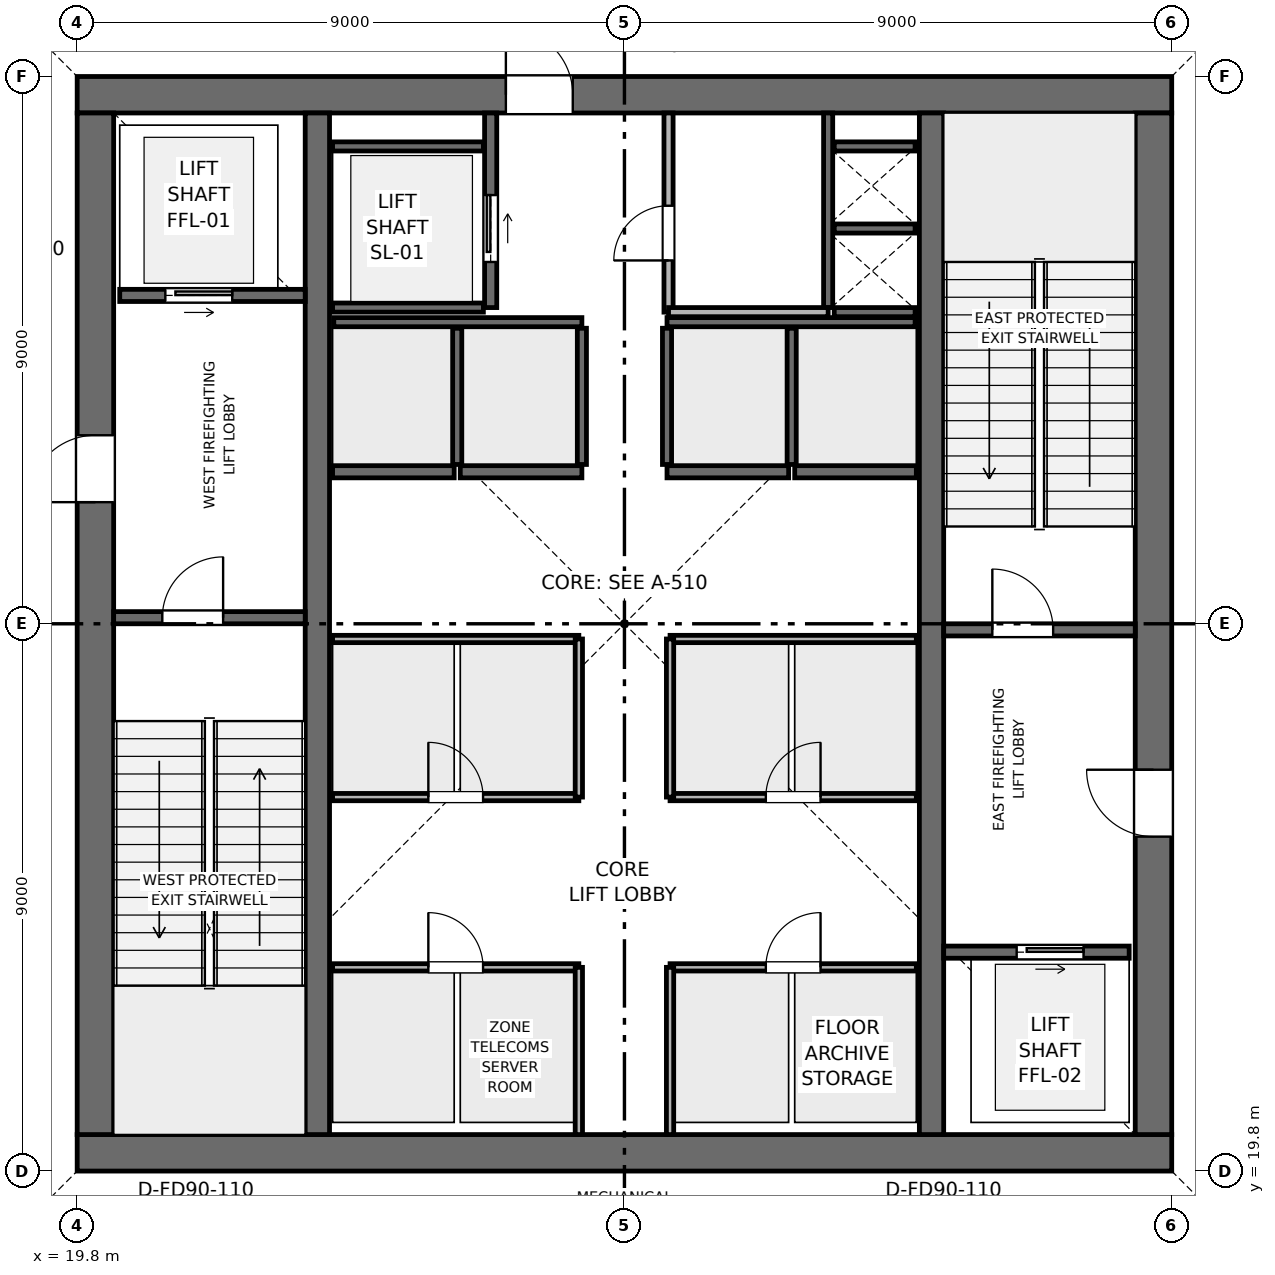
"""IFC4 building model, lengths in metres.
Left out: names, types, materials, properties, quantities, classifications, styles, units other than length and angle.
Written with IfcOpenShell. Run it as: python <this file> out.ifc"""

import sys

from ifc_helpers import new_model, si_unit, direction, frame, frame_2d, origin, place, context, subcontext, project, spatial, rectangle, extrude, element, fill, save


model = new_model("IFC4")
c1 = context("Model", 3, precision=1e-05, world=origin(), true_north=direction((0.0, 1.0)))
c2 = subcontext(c1, "Body", "Model", "MODEL_VIEW")
j1 = project(units=[si_unit("LENGTHUNIT", "METRE"), si_unit("PLANEANGLEUNIT", "RADIAN")], contexts=[c1])
p1 = place(None, origin())
s1 = spatial("IfcSite", under=j1, at=p1, CompositionType="ELEMENT")
p2 = place(p1, origin())
s2 = spatial("IfcBuilding", under=s1, at=p2, CompositionType="ELEMENT")
p3 = place(p2, frame((0.0, 0.0, 284.1)))
s3 = spatial("IfcBuildingStorey", under=s2, at=p3, CompositionType="ELEMENT", Elevation=284.1)
p4 = place(p3, frame((19.8, 20.1, 0.0), z_axis=(0.0, 0.0, 1.0), x_axis=(1.0, 0.0, 0.0)))
e1 = element("IfcWall", 1, at=p4, inside=s3, PredefinedType="SHEAR", context=c2, shape_type="SweptSolid", body=[
    extrude(rectangle(XDim=18.0, YDim=0.6, at=frame_2d((9.0, 0.0))), origin(), (0.0, 0.0, 1.0), 5.4),
])
p5 = place(p3, frame((19.8, 37.5, 0.0), z_axis=(0.0, 0.0, 1.0), x_axis=(1.0, 0.0, 0.0)))
e2 = element("IfcWall", 2, at=p5, inside=s3, PredefinedType="SHEAR", context=c2, shape_type="SweptSolid", body=[
    extrude(rectangle(XDim=18.0, YDim=0.6, at=frame_2d((9.0, 0.0))), origin(), (0.0, 0.0, 1.0), 5.4),
])
p6 = place(p5, frame((7.05, 0.0, 0.0)))
e3 = element("IfcOpeningElement", 3, at=p6, cuts=e2, PredefinedType="OPENING", context=c2, shape_type="SweptSolid", body=[
    extrude(rectangle(XDim=1.1, YDim=2.15, at=frame_2d((0.55, 1.075))), frame((0.0, 0.31, 0.0), z_axis=(0.0, -1.0, 0.0), x_axis=(1.0, 0.0, 0.0)), (0.0, 0.0, 1.0), 0.62),
])
p7 = place(p3, frame((20.1, 20.4, 0.0), z_axis=(0.0, 0.0, 1.0), x_axis=(0.0, 1.0, 0.0)))
e4 = element("IfcWall", 4, at=p7, inside=s3, PredefinedType="SHEAR", context=c2, shape_type="SweptSolid", body=[
    extrude(rectangle(XDim=16.8, YDim=0.6, at=frame_2d((8.4, 0.0))), origin(), (0.0, 0.0, 1.0), 5.4),
])
p8 = place(p7, frame((10.4, 0.0, 0.0)))
e5 = element("IfcOpeningElement", 5, at=p8, cuts=e4, PredefinedType="OPENING", context=c2, shape_type="SweptSolid", body=[
    extrude(rectangle(XDim=1.1, YDim=2.15, at=frame_2d((0.55, 1.075))), frame((0.0, 0.31, 0.0), z_axis=(0.0, -1.0, 0.0), x_axis=(1.0, 0.0, 0.0)), (0.0, 0.0, 1.0), 0.62),
])
p9 = place(p3, frame((37.5, 20.4, 0.0), z_axis=(0.0, 0.0, 1.0), x_axis=(0.0, 1.0, 0.0)))
e6 = element("IfcWall", 6, at=p9, inside=s3, PredefinedType="SHEAR", context=c2, shape_type="SweptSolid", body=[
    extrude(rectangle(XDim=16.8, YDim=0.6, at=frame_2d((8.4, 0.0))), origin(), (0.0, 0.0, 1.0), 5.4),
])
p10 = place(p9, frame((4.9, 0.0, 0.0)))
e7 = element("IfcOpeningElement", 7, at=p10, cuts=e6, PredefinedType="OPENING", context=c2, shape_type="SweptSolid", body=[
    extrude(rectangle(XDim=1.1, YDim=2.15, at=frame_2d((0.55, 1.075))), frame((0.0, 0.31, 0.0), z_axis=(0.0, -1.0, 0.0), x_axis=(1.0, 0.0, 0.0)), (0.0, 0.0, 1.0), 0.62),
])
for number, where, z_axis, x_axis in (
    (8, (23.75, 20.4, 0.0), (0.0, 0.0, 1.0), (0.0, 1.0, 0.0)),
    (9, (33.85, 20.4, 0.0), (0.0, 0.0, 1.0), (0.0, 1.0, 0.0)),
):
    element("IfcWall", number, at=place(p3, frame(where, z_axis=z_axis, x_axis=x_axis)), inside=s3, PredefinedType="SHEAR", context=c2, shape_type="SweptSolid", body=[
        extrude(rectangle(XDim=16.8, YDim=0.4, at=frame_2d((8.4, 0.0))), origin(), (0.0, 0.0, 1.0), 5.4),
    ])
p11 = place(p3, frame((20.4, 28.9, 0.0), z_axis=(0.0, 0.0, 1.0), x_axis=(1.0, 0.0, 0.0)))
e10 = element("IfcWall", 10, at=p11, inside=s3, PredefinedType="SHEAR", context=c2, shape_type="SweptSolid", body=[
    extrude(rectangle(XDim=3.15, YDim=0.2, at=frame_2d((1.575, 0.0))), origin(), (0.0, 0.0, 1.0), 5.05),
])
p12 = place(p11, frame((0.8, 0.0, 0.0)))
e11 = element("IfcOpeningElement", 11, at=p12, cuts=e10, PredefinedType="OPENING", context=c2, shape_type="SweptSolid", body=[
    extrude(rectangle(XDim=1.0, YDim=2.1, at=frame_2d((0.5, 1.05))), frame((0.0, 0.11, 0.0), z_axis=(0.0, -1.0, 0.0), x_axis=(1.0, 0.0, 0.0)), (0.0, 0.0, 1.0), 0.22),
])
p13 = place(p3, frame((34.05, 28.7, 0.0), z_axis=(0.0, 0.0, 1.0), x_axis=(1.0, 0.0, 0.0)))
e12 = element("IfcWall", 12, at=p13, inside=s3, PredefinedType="SHEAR", context=c2, shape_type="SweptSolid", body=[
    extrude(rectangle(XDim=3.15, YDim=0.2, at=frame_2d((1.575, 0.0))), origin(), (0.0, 0.0, 1.0), 5.05),
])
p14 = place(p13, frame((0.8, 0.0, 0.0)))
e13 = element("IfcOpeningElement", 13, at=p14, cuts=e12, PredefinedType="OPENING", context=c2, shape_type="SweptSolid", body=[
    extrude(rectangle(XDim=1.0, YDim=2.1, at=frame_2d((0.5, 1.05))), frame((0.0, 0.11, 0.0), z_axis=(0.0, -1.0, 0.0), x_axis=(1.0, 0.0, 0.0)), (0.0, 0.0, 1.0), 0.22),
])
p15 = place(p3, frame((32.15, 34.0, 0.0), z_axis=(0.0, 0.0, 1.0), x_axis=(0.0, 1.0, 0.0)))
e14 = element("IfcWall", 14, at=p15, inside=s3, PredefinedType="SHEAR", context=c2, shape_type="SweptSolid", body=[
    extrude(rectangle(XDim=3.2, YDim=0.15, at=frame_2d((1.6, 0.0))), origin(), (0.0, 0.0, 1.0), 5.05),
])
for number, where, z_axis, x_axis in (
    (15, (32.25, 33.925, 0.0), (0.0, 0.0, 1.0), (1.0, 0.0, 0.0)),
    (16, (32.25, 35.3, 0.0), (0.0, 0.0, 1.0), (1.0, 0.0, 0.0)),
):
    element("IfcWall", number, at=place(p3, frame(where, z_axis=z_axis, x_axis=x_axis)), inside=s3, PredefinedType="SHEAR", context=c2, shape_type="SweptSolid", body=[
        extrude(rectangle(XDim=1.33, YDim=0.15, at=frame_2d((0.665, 0.0))), origin(), (0.0, 0.0, 1.0), 5.05),
    ])
p16 = place(p3, frame((20.5, 34.2, 0.0), z_axis=(0.0, 0.0, 1.0), x_axis=(1.0, 0.0, 0.0)))
e17 = element("IfcWall", 17, at=p16, inside=s3, PredefinedType="SHEAR", context=c2, shape_type="SweptSolid", body=[
    extrude(rectangle(XDim=3.05, YDim=0.2, at=frame_2d((1.525, 0.0))), origin(), (0.0, 0.0, 1.0), 5.05),
])
p17 = place(p16, frame((0.75, 0.0, 0.0)))
e18 = element("IfcOpeningElement", 18, at=p17, cuts=e17, PredefinedType="OPENING", context=c2, shape_type="SweptSolid", body=[
    extrude(rectangle(XDim=1.1, YDim=2.15, at=frame_2d((0.55, 1.075))), frame((0.0, 0.11, 0.0), z_axis=(0.0, -1.0, 0.0), x_axis=(1.0, 0.0, 0.0)), (0.0, 0.0, 1.0), 0.22),
])
p18 = place(p3, frame((34.05, 23.4, 0.0), z_axis=(0.0, 0.0, 1.0), x_axis=(1.0, 0.0, 0.0)))
e19 = element("IfcWall", 19, at=p18, inside=s3, PredefinedType="SHEAR", context=c2, shape_type="SweptSolid", body=[
    extrude(rectangle(XDim=3.05, YDim=0.2, at=frame_2d((1.525, 0.0))), origin(), (0.0, 0.0, 1.0), 5.05),
])
p19 = place(p18, frame((1.2, 0.0, 0.0)))
e20 = element("IfcOpeningElement", 20, at=p19, cuts=e19, PredefinedType="OPENING", context=c2, shape_type="SweptSolid", body=[
    extrude(rectangle(XDim=1.1, YDim=2.15, at=frame_2d((0.55, 1.075))), frame((0.0, 0.11, 0.0), z_axis=(0.0, -1.0, 0.0), x_axis=(1.0, 0.0, 0.0)), (0.0, 0.0, 1.0), 0.22),
])
p20 = place(p3, frame((26.6, 34.0, 0.0), z_axis=(0.0, 0.0, 1.0), x_axis=(0.0, 1.0, 0.0)))
e21 = element("IfcWall", 21, at=p20, inside=s3, PredefinedType="SHEAR", context=c2, shape_type="SweptSolid", body=[
    extrude(rectangle(XDim=3.2, YDim=0.2, at=frame_2d((1.6, 0.0))), origin(), (0.0, 0.0, 1.0), 5.05),
])
p21 = place(p20, frame((0.75, 0.0, 0.0)))
e22 = element("IfcOpeningElement", 22, at=p21, cuts=e21, PredefinedType="OPENING", context=c2, shape_type="SweptSolid", body=[
    extrude(rectangle(XDim=1.1, YDim=2.15, at=frame_2d((0.55, 1.075))), frame((0.0, 0.11, 0.0), z_axis=(0.0, -1.0, 0.0), x_axis=(1.0, 0.0, 0.0)), (0.0, 0.0, 1.0), 0.22),
])
for number, where, z_axis, x_axis in (
    (23, (24.0, 34.0, 0.0), (0.0, 0.0, 1.0), (1.0, 0.0, 0.0)),
    (24, (24.0, 36.65, 0.0), (0.0, 0.0, 1.0), (1.0, 0.0, 0.0)),
):
    element("IfcWall", number, at=place(p3, frame(where, z_axis=z_axis, x_axis=x_axis)), inside=s3, PredefinedType="SHEAR", context=c2, shape_type="SweptSolid", body=[
        extrude(rectangle(XDim=2.48, YDim=0.15, at=frame_2d((1.24, 0.0))), origin(), (0.0, 0.0, 1.0), 5.05),
    ])
for number, where, z_axis, x_axis in (
    (25, (24.0, 31.3, 0.0), (0.0, 0.0, 1.0), (1.0, 0.0, 0.0)),
    (26, (26.1, 31.3, 0.0), (0.0, 0.0, 1.0), (1.0, 0.0, 0.0)),
    (27, (29.5, 31.3, 0.0), (0.0, 0.0, 1.0), (1.0, 0.0, 0.0)),
    (28, (31.6, 31.3, 0.0), (0.0, 0.0, 1.0), (1.0, 0.0, 0.0)),
):
    element("IfcWall", number, at=place(p3, frame(where, z_axis=z_axis, x_axis=x_axis)), inside=s3, PredefinedType="SHEAR", context=c2, shape_type="SweptSolid", body=[
        extrude(rectangle(XDim=2.0, YDim=0.2, at=frame_2d((1.0, 0.0))), origin(), (0.0, 0.0, 1.0), 5.05),
    ])
p22 = place(p3, frame((32.25, 36.65, 0.0), z_axis=(0.0, 0.0, 1.0), x_axis=(1.0, 0.0, 0.0)))
e29 = element("IfcWall", 29, at=p22, inside=s3, PredefinedType="SHEAR", context=c2, shape_type="SweptSolid", body=[
    extrude(rectangle(XDim=1.33, YDim=0.15, at=frame_2d((0.665, 0.0))), origin(), (0.0, 0.0, 1.0), 5.05),
])
for number, where, z_axis, x_axis in (
    (30, (24.02, 33.76, 0.0), (0.0, 0.0, 1.0), (1.0, 0.0, 0.0)),
    (31, (29.5, 33.76, 0.0), (0.0, 0.0, 1.0), (1.0, 0.0, 0.0)),
):
    element("IfcWall", number, at=place(p3, frame(where, z_axis=z_axis, x_axis=x_axis)), inside=s3, PredefinedType="SHEAR", context=c2, shape_type="SweptSolid", body=[
        extrude(rectangle(XDim=4.08, YDim=0.15, at=frame_2d((2.04, 0.0))), origin(), (0.0, 0.0, 1.0), 5.05),
    ])
for number, where, z_axis, x_axis in (
    (32, (26.05, 31.42, 0.0), (0.0, 0.0, 1.0), (0.0, 1.0, 0.0)),
    (33, (28.1, 31.42, 0.0), (0.0, 0.0, 1.0), (0.0, 1.0, 0.0)),
    (34, (29.5, 31.42, 0.0), (0.0, 0.0, 1.0), (0.0, 1.0, 0.0)),
    (35, (31.55, 31.42, 0.0), (0.0, 0.0, 1.0), (0.0, 1.0, 0.0)),
):
    element("IfcWall", number, at=place(p3, frame(where, z_axis=z_axis, x_axis=x_axis)), inside=s3, PredefinedType="SHEAR", context=c2, shape_type="SweptSolid", body=[
        extrude(rectangle(XDim=2.24, YDim=0.15, at=frame_2d((1.12, 0.0))), origin(), (0.0, 0.0, 1.0), 5.05),
    ])
p23 = place(p3, frame((29.525, 33.925, 0.0), z_axis=(0.0, 0.0, 1.0), x_axis=(0.0, 1.0, 0.0)))
e36 = element("IfcWall", 36, at=p23, inside=s3, PredefinedType="PARTITIONING", context=c2, shape_type="SweptSolid", body=[
    extrude(rectangle(XDim=3.275, YDim=0.15, at=frame_2d((1.637, 0.0))), origin(), (0.0, 0.0, 1.0), 5.05),
])
p24 = place(p23, frame((0.85, 0.0, 0.0)))
e37 = element("IfcOpeningElement", 37, at=p24, cuts=e36, PredefinedType="OPENING", context=c2, shape_type="SweptSolid", body=[
    extrude(rectangle(XDim=0.9, YDim=2.1, at=frame_2d((0.45, 1.05))), frame((0.0, 0.085, 0.0), z_axis=(0.0, -1.0, 0.0), x_axis=(1.0, 0.0, 0.0)), (0.0, 0.0, 1.0), 0.17),
])
p25 = place(p3, frame((29.525, 33.925, 0.0), z_axis=(0.0, 0.0, 1.0), x_axis=(1.0, 0.0, 0.0)))
e38 = element("IfcWall", 38, at=p25, inside=s3, PredefinedType="PARTITIONING", context=c2, shape_type="SweptSolid", body=[
    extrude(rectangle(XDim=2.625, YDim=0.15, at=frame_2d((1.312, 0.0))), origin(), (0.0, 0.0, 1.0), 5.05),
])
p26 = place(p3, frame((24.0, 23.15, 0.0), z_axis=(0.0, 0.0, 1.0), x_axis=(1.0, 0.0, 0.0)))
e39 = element("IfcWall", 39, at=p26, inside=s3, PredefinedType="PARTITIONING", context=c2, shape_type="SweptSolid", body=[
    extrude(rectangle(XDim=4.05, YDim=0.12, at=frame_2d((2.025, 0.0))), origin(), (0.0, 0.0, 1.0), 5.05),
])
p27 = place(p26, frame((1.575, 0.0, 0.0)))
e40 = element("IfcOpeningElement", 40, at=p27, cuts=e39, PredefinedType="OPENING", context=c2, shape_type="SweptSolid", body=[
    extrude(rectangle(XDim=0.9, YDim=2.1, at=frame_2d((0.45, 1.05))), frame((0.0, 0.07, 0.0), z_axis=(0.0, -1.0, 0.0), x_axis=(1.0, 0.0, 0.0)), (0.0, 0.0, 1.0), 0.14),
])
p28 = place(p3, frame((28.05, 20.4, 0.0), z_axis=(0.0, 0.0, 1.0), x_axis=(0.0, 1.0, 0.0)))
e41 = element("IfcWall", 41, at=p28, inside=s3, PredefinedType="PARTITIONING", context=c2, shape_type="SweptSolid", body=[
    extrude(rectangle(XDim=2.75, YDim=0.12, at=frame_2d((1.375, 0.0))), origin(), (0.0, 0.0, 1.0), 5.05),
])
p29 = place(p3, frame((29.55, 23.15, 0.0), z_axis=(0.0, 0.0, 1.0), x_axis=(1.0, 0.0, 0.0)))
e42 = element("IfcWall", 42, at=p29, inside=s3, PredefinedType="PARTITIONING", context=c2, shape_type="SweptSolid", body=[
    extrude(rectangle(XDim=4.05, YDim=0.12, at=frame_2d((2.025, 0.0))), origin(), (0.0, 0.0, 1.0), 5.05),
])
p30 = place(p29, frame((1.575, 0.0, 0.0)))
e43 = element("IfcOpeningElement", 43, at=p30, cuts=e42, PredefinedType="OPENING", context=c2, shape_type="SweptSolid", body=[
    extrude(rectangle(XDim=0.9, YDim=2.1, at=frame_2d((0.45, 1.05))), frame((0.0, 0.07, 0.0), z_axis=(0.0, -1.0, 0.0), x_axis=(1.0, 0.0, 0.0)), (0.0, 0.0, 1.0), 0.14),
])
p31 = place(p3, frame((29.55, 20.4, 0.0), z_axis=(0.0, 0.0, 1.0), x_axis=(0.0, 1.0, 0.0)))
e44 = element("IfcWall", 44, at=p31, inside=s3, PredefinedType="PARTITIONING", context=c2, shape_type="SweptSolid", body=[
    extrude(rectangle(XDim=2.75, YDim=0.12, at=frame_2d((1.375, 0.0))), origin(), (0.0, 0.0, 1.0), 5.05),
])
p32 = place(p3, frame((24.0, 25.95, 0.0), z_axis=(0.0, 0.0, 1.0), x_axis=(1.0, 0.0, 0.0)))
e45 = element("IfcWall", 45, at=p32, inside=s3, PredefinedType="PARTITIONING", context=c2, shape_type="SweptSolid", body=[
    extrude(rectangle(XDim=4.05, YDim=0.12, at=frame_2d((2.025, 0.0))), origin(), (0.0, 0.0, 1.0), 5.05),
])
p33 = place(p32, frame((1.575, 0.0, 0.0)))
e46 = element("IfcOpeningElement", 46, at=p33, cuts=e45, PredefinedType="OPENING", context=c2, shape_type="SweptSolid", body=[
    extrude(rectangle(XDim=0.9, YDim=2.1, at=frame_2d((0.45, 1.05))), frame((0.0, 0.07, 0.0), z_axis=(0.0, -1.0, 0.0), x_axis=(1.0, 0.0, 0.0)), (0.0, 0.0, 1.0), 0.14),
])
p34 = place(p3, frame((24.0, 28.55, 0.0), z_axis=(0.0, 0.0, 1.0), x_axis=(1.0, 0.0, 0.0)))
e47 = element("IfcWall", 47, at=p34, inside=s3, PredefinedType="PARTITIONING", context=c2, shape_type="SweptSolid", body=[
    extrude(rectangle(XDim=4.05, YDim=0.12, at=frame_2d((2.025, 0.0))), origin(), (0.0, 0.0, 1.0), 5.05),
])
p35 = place(p3, frame((28.05, 25.95, 0.0), z_axis=(0.0, 0.0, 1.0), x_axis=(0.0, 1.0, 0.0)))
e48 = element("IfcWall", 48, at=p35, inside=s3, PredefinedType="PARTITIONING", context=c2, shape_type="SweptSolid", body=[
    extrude(rectangle(XDim=2.6, YDim=0.12, at=frame_2d((1.3, 0.0))), origin(), (0.0, 0.0, 1.0), 5.05),
])
p36 = place(p3, frame((29.55, 25.95, 0.0), z_axis=(0.0, 0.0, 1.0), x_axis=(1.0, 0.0, 0.0)))
e49 = element("IfcWall", 49, at=p36, inside=s3, PredefinedType="PARTITIONING", context=c2, shape_type="SweptSolid", body=[
    extrude(rectangle(XDim=4.05, YDim=0.12, at=frame_2d((2.025, 0.0))), origin(), (0.0, 0.0, 1.0), 5.05),
])
p37 = place(p36, frame((1.575, 0.0, 0.0)))
e50 = element("IfcOpeningElement", 50, at=p37, cuts=e49, PredefinedType="OPENING", context=c2, shape_type="SweptSolid", body=[
    extrude(rectangle(XDim=0.9, YDim=2.1, at=frame_2d((0.45, 1.05))), frame((0.0, 0.07, 0.0), z_axis=(0.0, -1.0, 0.0), x_axis=(1.0, 0.0, 0.0)), (0.0, 0.0, 1.0), 0.14),
])
p38 = place(p3, frame((29.55, 28.55, 0.0), z_axis=(0.0, 0.0, 1.0), x_axis=(1.0, 0.0, 0.0)))
e51 = element("IfcWall", 51, at=p38, inside=s3, PredefinedType="PARTITIONING", context=c2, shape_type="SweptSolid", body=[
    extrude(rectangle(XDim=4.05, YDim=0.12, at=frame_2d((2.025, 0.0))), origin(), (0.0, 0.0, 1.0), 5.05),
])
p39 = place(p3, frame((29.55, 25.95, 0.0), z_axis=(0.0, 0.0, 1.0), x_axis=(0.0, 1.0, 0.0)))
e52 = element("IfcWall", 52, at=p39, inside=s3, PredefinedType="PARTITIONING", context=c2, shape_type="SweptSolid", body=[
    extrude(rectangle(XDim=2.6, YDim=0.12, at=frame_2d((1.3, 0.0))), origin(), (0.0, 0.0, 1.0), 5.05),
])
p40 = place(p12, origin())
e53 = element("IfcDoor", 53, at=p40, inside=s3, OperationType="SINGLE_SWING_RIGHT", PredefinedType="DOOR", context=c2, shape_type="SweptSolid", body=[
    extrude(rectangle(XDim=1.0, YDim=2.1, at=frame_2d((0.5, 1.05))), frame((0.0, 0.025, 0.0), z_axis=(0.0, -1.0, 0.0), x_axis=(1.0, 0.0, 0.0)), (0.0, 0.0, 1.0), 0.05),
])
fill(e11, e53)
p41 = place(p14, origin())
e54 = element("IfcDoor", 54, at=p41, inside=s3, OperationType="SINGLE_SWING_LEFT", PredefinedType="DOOR", context=c2, shape_type="SweptSolid", body=[
    extrude(rectangle(XDim=1.0, YDim=2.1, at=frame_2d((0.5, 1.05))), frame((0.0, 0.025, 0.0), z_axis=(0.0, -1.0, 0.0), x_axis=(1.0, 0.0, 0.0)), (0.0, 0.0, 1.0), 0.05),
])
fill(e13, e54)
p42 = place(p17, origin())
e55 = element("IfcDoor", 55, at=p42, inside=s3, OperationType="SLIDING_TO_RIGHT", PredefinedType="DOOR", context=c2, shape_type="SweptSolid", body=[
    extrude(rectangle(XDim=1.1, YDim=2.15, at=frame_2d((0.55, 1.075))), frame((0.0, 0.025, 0.0), z_axis=(0.0, -1.0, 0.0), x_axis=(1.0, 0.0, 0.0)), (0.0, 0.0, 1.0), 0.05),
])
fill(e18, e55)
p43 = place(p19, origin())
e56 = element("IfcDoor", 56, at=p43, inside=s3, OperationType="SLIDING_TO_RIGHT", PredefinedType="DOOR", context=c2, shape_type="SweptSolid", body=[
    extrude(rectangle(XDim=1.1, YDim=2.15, at=frame_2d((0.55, 1.075))), frame((0.0, 0.025, 0.0), z_axis=(0.0, -1.0, 0.0), x_axis=(1.0, 0.0, 0.0)), (0.0, 0.0, 1.0), 0.05),
])
fill(e20, e56)
p44 = place(p21, origin())
e57 = element("IfcDoor", 57, at=p44, inside=s3, OperationType="SLIDING_TO_RIGHT", PredefinedType="DOOR", context=c2, shape_type="SweptSolid", body=[
    extrude(rectangle(XDim=1.1, YDim=2.15, at=frame_2d((0.55, 1.075))), frame((0.0, 0.025, 0.0), z_axis=(0.0, -1.0, 0.0), x_axis=(1.0, 0.0, 0.0)), (0.0, 0.0, 1.0), 0.05),
])
fill(e22, e57)
p45 = place(p24, origin())
e58 = element("IfcDoor", 58, at=p45, inside=s3, OperationType="SINGLE_SWING_LEFT", PredefinedType="DOOR", context=c2, shape_type="SweptSolid", body=[
    extrude(rectangle(XDim=0.9, YDim=2.1, at=frame_2d((0.45, 1.05))), frame((0.0, 0.025, 0.0), z_axis=(0.0, -1.0, 0.0), x_axis=(1.0, 0.0, 0.0)), (0.0, 0.0, 1.0), 0.05),
])
fill(e37, e58)
p46 = place(p27, origin())
e59 = element("IfcDoor", 59, at=p46, inside=s3, OperationType="SINGLE_SWING_LEFT", PredefinedType="DOOR", context=c2, shape_type="SweptSolid", body=[
    extrude(rectangle(XDim=0.9, YDim=2.1, at=frame_2d((0.45, 1.05))), frame((0.0, 0.025, 0.0), z_axis=(0.0, -1.0, 0.0), x_axis=(1.0, 0.0, 0.0)), (0.0, 0.0, 1.0), 0.05),
])
fill(e40, e59)
p47 = place(p30, origin())
e60 = element("IfcDoor", 60, at=p47, inside=s3, OperationType="SINGLE_SWING_RIGHT", PredefinedType="DOOR", context=c2, shape_type="SweptSolid", body=[
    extrude(rectangle(XDim=0.9, YDim=2.1, at=frame_2d((0.45, 1.05))), frame((0.0, 0.025, 0.0), z_axis=(0.0, -1.0, 0.0), x_axis=(1.0, 0.0, 0.0)), (0.0, 0.0, 1.0), 0.05),
])
fill(e43, e60)
p48 = place(p33, origin())
e61 = element("IfcDoor", 61, at=p48, inside=s3, OperationType="SINGLE_SWING_LEFT", PredefinedType="DOOR", context=c2, shape_type="SweptSolid", body=[
    extrude(rectangle(XDim=0.9, YDim=2.1, at=frame_2d((0.45, 1.05))), frame((0.0, 0.025, 0.0), z_axis=(0.0, -1.0, 0.0), x_axis=(1.0, 0.0, 0.0)), (0.0, 0.0, 1.0), 0.05),
])
fill(e46, e61)
p49 = place(p37, origin())
e62 = element("IfcDoor", 62, at=p49, inside=s3, OperationType="SINGLE_SWING_RIGHT", PredefinedType="DOOR", context=c2, shape_type="SweptSolid", body=[
    extrude(rectangle(XDim=0.9, YDim=2.1, at=frame_2d((0.45, 1.05))), frame((0.0, 0.025, 0.0), z_axis=(0.0, -1.0, 0.0), x_axis=(1.0, 0.0, 0.0)), (0.0, 0.0, 1.0), 0.05),
])
fill(e50, e62)
p50 = place(p8, origin())
e63 = element("IfcDoor", 63, at=p50, inside=s3, OperationType="SINGLE_SWING_LEFT", PredefinedType="DOOR", context=c2, shape_type="SweptSolid", body=[
    extrude(rectangle(XDim=1.1, YDim=2.15, at=frame_2d((0.55, 1.075))), frame((0.0, 0.025, 0.0), z_axis=(0.0, -1.0, 0.0), x_axis=(1.0, 0.0, 0.0)), (0.0, 0.0, 1.0), 0.05),
])
fill(e5, e63)
p51 = place(p10, origin())
e64 = element("IfcDoor", 64, at=p51, inside=s3, OperationType="SINGLE_SWING_RIGHT", PredefinedType="DOOR", context=c2, shape_type="SweptSolid", body=[
    extrude(rectangle(XDim=1.1, YDim=2.15, at=frame_2d((0.55, 1.075))), frame((0.0, 0.025, 0.0), z_axis=(0.0, -1.0, 0.0), x_axis=(1.0, 0.0, 0.0)), (0.0, 0.0, 1.0), 0.05),
])
fill(e7, e64)
p52 = place(p6, origin())
e65 = element("IfcDoor", 65, at=p52, inside=s3, OperationType="SINGLE_SWING_LEFT", PredefinedType="DOOR", context=c2, shape_type="SweptSolid", body=[
    extrude(rectangle(XDim=1.1, YDim=2.15, at=frame_2d((0.55, 1.075))), frame((0.0, 0.025, 0.0), z_axis=(0.0, -1.0, 0.0), x_axis=(1.0, 0.0, 0.0)), (0.0, 0.0, 1.0), 0.05),
])
fill(e3, e65)
save(model, sys.argv[1])
